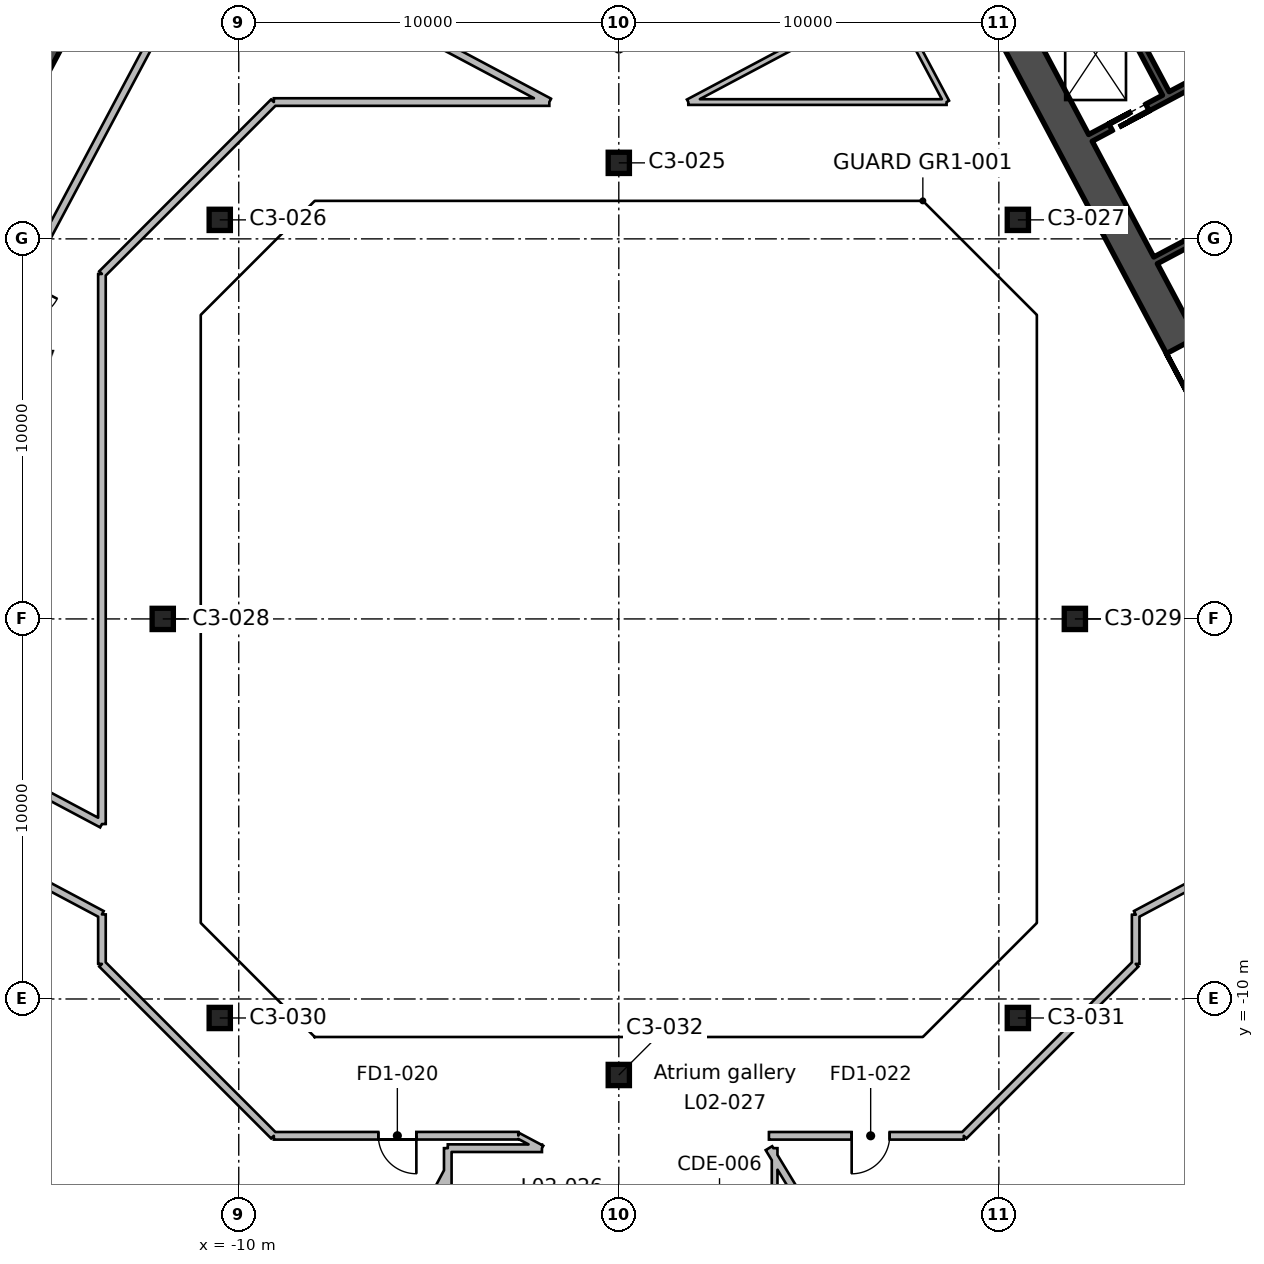
"""IFC4 building model, lengths in metres.
Left out: names, types, materials, properties, quantities, classifications, styles, units other than length and angle.
Written with IfcOpenShell. Run it as: python <this file> out.ifc"""

import sys

from ifc_helpers import new_model, si_unit, direction, frame, frame_2d, origin, origin_2d, place, context, subcontext, project, spatial, rectangle, hollow_rectangle, extrude, element, fill, save


model = new_model("IFC4")
c1 = context("Model", 3, precision=1e-05, world=origin(), true_north=direction((0.0, 1.0)))
c2 = subcontext(c1, "Body", "Model", "MODEL_VIEW")
j1 = project(units=[si_unit("LENGTHUNIT", "METRE"), si_unit("PLANEANGLEUNIT", "RADIAN")], contexts=[c1])
p1 = place(None, origin())
s1 = spatial("IfcSite", under=j1, at=p1, CompositionType="ELEMENT")
p2 = place(p1, origin())
s2 = spatial("IfcBuilding", under=s1, at=p2, CompositionType="ELEMENT")
p3 = place(p2, frame((0.0, 0.0, 12.2)))
s3 = spatial("IfcBuildingStorey", under=s2, at=p3, CompositionType="ELEMENT", Elevation=12.2)
for number, where, z_axis, x_axis in (
    (1, (0.0, -12.0, 0.0), (0.0, 0.0, 1.0), (1.0, 0.0, 0.0)),
    (2, (-10.5, -10.5, 0.0), (0.0, 0.0, 1.0), (1.0, 0.0, 0.0)),
    (3, (10.5, -10.5, 0.0), (0.0, 0.0, 1.0), (1.0, 0.0, 0.0)),
    (4, (-12.0, 0.0, 0.0), (0.0, 0.0, 1.0), (1.0, 0.0, 0.0)),
    (5, (12.0, 0.0, 0.0), (0.0, 0.0, 1.0), (1.0, 0.0, 0.0)),
    (6, (-10.5, 10.5, 0.0), (0.0, 0.0, 1.0), (1.0, 0.0, 0.0)),
    (7, (10.5, 10.5, 0.0), (0.0, 0.0, 1.0), (1.0, 0.0, 0.0)),
    (8, (0.0, 12.0, 0.0), (0.0, 0.0, 1.0), (1.0, 0.0, 0.0)),
):
    element("IfcColumn", number, at=place(p3, frame(where, z_axis=z_axis, x_axis=x_axis)), inside=s3, PredefinedType="COLUMN", context=c2, shape_type="SweptSolid", body=[
        extrude(hollow_rectangle(XDim=0.559, YDim=0.559, WallThickness=0.024, InnerFilletRadius=0.012, OuterFilletRadius=0.035, at=origin_2d()), origin(), (0.0, 0.0, 1.0), 5.4),
    ])
p4 = place(p3, frame((-13.362, 18.43, 0.0), z_axis=(0.0, 0.0, 1.0), x_axis=(-0.46947084998, -0.882947971864, 0.0)))
e9 = element("IfcWall", 9, at=p4, inside=s3, PredefinedType="SHEAR", context=c2, shape_type="SweptSolid", body=[
    extrude(rectangle(XDim=20.0, YDim=0.9, at=frame_2d((10.0, 0.0))), origin(), (0.0, 0.0, 1.0), 5.4),
])
p5 = place(p4, frame((7.0, 0.0, 0.0)))
e10 = element("IfcOpeningElement", 10, at=p5, cuts=e9, PredefinedType="OPENING", context=c2, shape_type="SweptSolid", body=[
    extrude(rectangle(XDim=2.4, YDim=2.4, at=frame_2d((1.2, 1.2))), frame((0.0, 0.46, 0.0), z_axis=(0.0, -1.0, 0.0), x_axis=(1.0, 0.0, 0.0)), (0.0, 0.0, 1.0), 0.92),
])
p6 = place(p3, frame((19.219, -1.107, 0.0), z_axis=(0.0, 0.0, 1.0), x_axis=(-0.46947084998, 0.882947971864, 0.0)))
e11 = element("IfcWall", 11, at=p6, inside=s3, PredefinedType="SHEAR", context=c2, shape_type="SweptSolid", body=[
    extrude(rectangle(XDim=20.0, YDim=0.9, at=frame_2d((10.0, 0.0))), origin(), (0.0, 0.0, 1.0), 5.4),
])
p7 = place(p6, frame((7.0, 0.0, 0.0)))
e12 = element("IfcOpeningElement", 12, at=p7, cuts=e11, PredefinedType="OPENING", context=c2, shape_type="SweptSolid", body=[
    extrude(rectangle(XDim=2.4, YDim=2.4, at=frame_2d((1.2, 1.2))), frame((0.0, 0.46, 0.0), z_axis=(0.0, -1.0, 0.0), x_axis=(1.0, 0.0, 0.0)), (0.0, 0.0, 1.0), 0.92),
])
p8 = place(p3, frame((14.394, 13.826, 0.0), z_axis=(0.0, 0.0, 1.0), x_axis=(-0.469494272526, 0.882935517501, 0.0)))
e13 = element("IfcWall", 13, at=p8, inside=s3, PredefinedType="SHEAR", context=c2, shape_type="SweptSolid", body=[
    extrude(rectangle(XDim=3.65, YDim=0.2, at=frame_2d((1.825, 0.0))), origin(), (0.0, 0.0, 1.0), 5.4),
])
p9 = place(p3, frame((18.138, 11.683, 0.0), z_axis=(0.0, 0.0, 1.0), x_axis=(-0.469480409012, 0.88294288918, 0.0)))
e14 = element("IfcWall", 14, at=p9, inside=s3, PredefinedType="SHEAR", context=c2, shape_type="SweptSolid", body=[
    extrude(rectangle(XDim=7.3, YDim=0.2, at=frame_2d((3.65, 0.0))), origin(), (0.0, 0.0, 1.0), 5.4),
])
p10 = place(p3, frame((14.124, 9.435, 0.0), z_axis=(0.0, 0.0, 1.0), x_axis=(0.882940221191, 0.469485426614, 0.0)))
e15 = element("IfcWall", 15, at=p10, inside=s3, PredefinedType="SHEAR", context=c2, shape_type="SweptSolid", body=[
    extrude(rectangle(XDim=10.0, YDim=0.2, at=frame_2d((5.0, 0.0))), origin(), (0.0, 0.0, 1.0), 5.4),
])
p11 = place(p10, frame((2.1, 0.0, 0.0)))
e16 = element("IfcOpeningElement", 16, at=p11, cuts=e15, PredefinedType="OPENING", context=c2, shape_type="SweptSolid", body=[
    extrude(rectangle(XDim=1.2, YDim=2.1, at=frame_2d((0.6, 1.05))), frame((0.0, 0.11, 0.0), z_axis=(0.0, -1.0, 0.0), x_axis=(1.0, 0.0, 0.0)), (0.0, 0.0, 1.0), 0.22),
])
p12 = place(p10, frame((5.4, 0.0, 0.0)))
e17 = element("IfcOpeningElement", 17, at=p12, cuts=e15, PredefinedType="OPENING", context=c2, shape_type="SweptSolid", body=[
    extrude(rectangle(XDim=1.1, YDim=2.1, at=frame_2d((0.55, 1.05))), frame((0.0, 0.11, 0.0), z_axis=(0.0, -1.0, 0.0), x_axis=(1.0, 0.0, 0.0)), (0.0, 0.0, 1.0), 0.22),
])
p13 = place(p10, frame((8.1, 0.0, 0.0)))
e18 = element("IfcOpeningElement", 18, at=p13, cuts=e15, PredefinedType="OPENING", context=c2, shape_type="SweptSolid", body=[
    extrude(rectangle(XDim=1.1, YDim=2.1, at=frame_2d((0.55, 1.05))), frame((0.0, 0.11, 0.0), z_axis=(0.0, -1.0, 0.0), x_axis=(1.0, 0.0, 0.0)), (0.0, 0.0, 1.0), 0.22),
])
p14 = place(p3, frame((12.41, 12.658, 0.0), z_axis=(0.0, 0.0, 1.0), x_axis=(0.8829484765, 0.469469900894, 0.0)))
e19 = element("IfcWall", 19, at=p14, inside=s3, PredefinedType="SHEAR", context=c2, shape_type="SweptSolid", body=[
    extrude(rectangle(XDim=4.5, YDim=0.2, at=frame_2d((2.25, 0.0))), origin(), (0.0, 0.0, 1.0), 5.4),
])
p15 = place(p14, frame((0.6, 0.0, 0.0)))
e20 = element("IfcOpeningElement", 20, at=p15, cuts=e19, PredefinedType="OPENING", context=c2, shape_type="SweptSolid", body=[
    extrude(rectangle(XDim=1.1, YDim=2.1, at=frame_2d((0.55, 1.05))), frame((0.0, 0.11, 0.0), z_axis=(0.0, -1.0, 0.0), x_axis=(1.0, 0.0, 0.0)), (0.0, 0.0, 1.0), 0.22),
])
p16 = place(p3, frame((-13.6, -9.077, 0.0), z_axis=(0.0, 0.0, 1.0), x_axis=(0.0, 1.0, 0.0)))
e21 = element("IfcWall", 21, at=p16, inside=s3, PredefinedType="PARTITIONING", context=c2, shape_type="SweptSolid", body=[
    extrude(rectangle(XDim=1.302, YDim=0.2, at=frame_2d((0.651, 0.0))), origin(), (0.0, 0.0, 1.0), 4.95),
])
p17 = place(p3, frame((-13.6, -7.775, 0.0), z_axis=(0.0, 0.0, 1.0), x_axis=(-0.882943264249, 0.469479703626, 0.0)))
e22 = element("IfcWall", 22, at=p17, inside=s3, PredefinedType="PARTITIONING", context=c2, shape_type="SweptSolid", body=[
    extrude(rectangle(XDim=34.636, YDim=0.2, at=frame_2d((17.318, 0.0))), origin(), (0.0, 0.0, 1.0), 4.95),
])
p18 = place(p17, frame((16.85, 0.0, 0.0)))
e23 = element("IfcOpeningElement", 23, at=p18, cuts=e22, PredefinedType="OPENING", context=c2, shape_type="SweptSolid", body=[
    extrude(rectangle(XDim=1.0, YDim=2.1, at=frame_2d((0.5, 1.05))), frame((0.0, 0.11, 0.0), z_axis=(0.0, -1.0, 0.0), x_axis=(1.0, 0.0, 0.0)), (0.0, 0.0, 1.0), 0.22),
])
p19 = place(p17, frame((14.25, 0.0, 0.0)))
e24 = element("IfcOpeningElement", 24, at=p19, cuts=e22, PredefinedType="OPENING", context=c2, shape_type="SweptSolid", body=[
    extrude(rectangle(XDim=1.0, YDim=2.1, at=frame_2d((0.5, 1.05))), frame((0.0, 0.11, 0.0), z_axis=(0.0, -1.0, 0.0), x_axis=(1.0, 0.0, 0.0)), (0.0, 0.0, 1.0), 0.22),
])
p20 = place(p3, frame((-13.6, -9.077, 0.0), z_axis=(0.0, 0.0, 1.0), x_axis=(0.707106781187, -0.707106781187, 0.0)))
e25 = element("IfcWall", 25, at=p20, inside=s3, PredefinedType="PARTITIONING", context=c2, shape_type="SweptSolid", body=[
    extrude(rectangle(XDim=6.397, YDim=0.2, at=frame_2d((3.198, 0.0))), origin(), (0.0, 0.0, 1.0), 4.95),
])
p21 = place(p3, frame((-9.077, -13.6, 0.0), z_axis=(0.0, 0.0, 1.0), x_axis=(0.999999878252, 0.000493452208, 0.0)))
e26 = element("IfcWall", 26, at=p21, inside=s3, PredefinedType="PARTITIONING", context=c2, shape_type="SweptSolid", body=[
    extrude(rectangle(XDim=6.432, YDim=0.2, at=frame_2d((3.216, 0.0))), origin(), (0.0, 0.0, 1.0), 4.95),
])
p22 = place(p21, frame((2.75, 0.0, 0.0)))
e27 = element("IfcOpeningElement", 27, at=p22, cuts=e26, PredefinedType="OPENING", context=c2, shape_type="SweptSolid", body=[
    extrude(rectangle(XDim=1.0, YDim=2.1, at=frame_2d((0.5, 1.05))), frame((0.0, 0.11, 0.0), z_axis=(0.0, -1.0, 0.0), x_axis=(1.0, 0.0, 0.0)), (0.0, 0.0, 1.0), 0.22),
])
p23 = place(p3, frame((-2.645, -13.597, 0.0), z_axis=(0.0, 0.0, 1.0), x_axis=(0.883079874776, -0.469222692083, 0.0)))
e28 = element("IfcWall", 28, at=p23, inside=s3, PredefinedType="PARTITIONING", context=c2, shape_type="SweptSolid", body=[
    extrude(rectangle(XDim=0.706, YDim=0.15, at=frame_2d((0.353, 0.0))), origin(), (0.0, 0.0, 1.0), 4.95),
])
p24 = place(p3, frame((-2.022, -13.928, 0.0), z_axis=(0.0, 0.0, 1.0), x_axis=(-0.999999301124, 0.001182265184, 0.0)))
e29 = element("IfcWall", 29, at=p24, inside=s3, PredefinedType="PARTITIONING", context=c2, shape_type="SweptSolid", body=[
    extrude(rectangle(XDim=2.478, YDim=0.2, at=frame_2d((1.239, 0.0))), origin(), (0.0, 0.0, 1.0), 4.95),
])
p25 = place(p3, frame((-4.5, -13.925, 0.0), z_axis=(0.0, 0.0, 1.0), x_axis=(0.0, -1.0, 0.0)))
e30 = element("IfcWall", 30, at=p25, inside=s3, PredefinedType="PARTITIONING", context=c2, shape_type="SweptSolid", body=[
    extrude(rectangle(XDim=2.05, YDim=0.2, at=frame_2d((1.025, 0.0))), origin(), (0.0, 0.0, 1.0), 4.95),
])
p26 = place(p3, frame((-4.5, -14.533, 0.0), z_axis=(0.0, 0.0, 1.0), x_axis=(-0.469522352041, -0.882920585859, 0.0)))
e31 = element("IfcWall", 31, at=p26, inside=s3, PredefinedType="PARTITIONING", context=c2, shape_type="SweptSolid", body=[
    extrude(rectangle(XDim=6.255, YDim=0.2, at=frame_2d((3.128, 0.0))), origin(), (0.0, 0.0, 1.0), 4.95),
])
p27 = place(p3, frame((4.1, -13.925, 0.0), z_axis=(0.0, 0.0, 1.0), x_axis=(0.0, -1.0, 0.0)))
e32 = element("IfcWall", 32, at=p27, inside=s3, PredefinedType="PARTITIONING", context=c2, shape_type="SweptSolid", body=[
    extrude(rectangle(XDim=2.05, YDim=0.15, at=frame_2d((1.025, 0.0))), origin(), (0.0, 0.0, 1.0), 4.95),
])
p28 = place(p3, frame((13.6, -7.782, 0.0), z_axis=(0.0, 0.0, 1.0), x_axis=(0.0, -1.0, 0.0)))
e33 = element("IfcWall", 33, at=p28, inside=s3, PredefinedType="PARTITIONING", context=c2, shape_type="SweptSolid", body=[
    extrude(rectangle(XDim=1.295, YDim=0.2, at=frame_2d((0.647, 0.0))), origin(), (0.0, 0.0, 1.0), 4.95),
])
p29 = place(p3, frame((13.6, -9.077, 0.0), z_axis=(0.0, 0.0, 1.0), x_axis=(-0.707106781187, -0.707106781187, 0.0)))
e34 = element("IfcWall", 34, at=p29, inside=s3, PredefinedType="PARTITIONING", context=c2, shape_type="SweptSolid", body=[
    extrude(rectangle(XDim=6.397, YDim=0.2, at=frame_2d((3.198, 0.0))), origin(), (0.0, 0.0, 1.0), 4.95),
])
p30 = place(p3, frame((9.077, -13.6, 0.0), z_axis=(0.0, 0.0, 1.0), x_axis=(-1.0, 0.0, 0.0)))
e35 = element("IfcWall", 35, at=p30, inside=s3, PredefinedType="PARTITIONING", context=c2, shape_type="SweptSolid", body=[
    extrude(rectangle(XDim=5.127, YDim=0.2, at=frame_2d((2.563, 0.0))), origin(), (0.0, 0.0, 1.0), 4.95),
])
p31 = place(p30, frame((1.95, 0.0, 0.0)))
e36 = element("IfcOpeningElement", 36, at=p31, cuts=e35, PredefinedType="OPENING", context=c2, shape_type="SweptSolid", body=[
    extrude(rectangle(XDim=1.0, YDim=2.1, at=frame_2d((0.5, 1.05))), frame((0.0, 0.11, 0.0), z_axis=(0.0, -1.0, 0.0), x_axis=(1.0, 0.0, 0.0)), (0.0, 0.0, 1.0), 0.22),
])
p32 = place(p3, frame((7.609, -19.965, 0.0), z_axis=(0.0, 0.0, 1.0), x_axis=(-0.518126246201, 0.855304152333, 0.0)))
e37 = element("IfcWall", 37, at=p32, inside=s3, PredefinedType="PARTITIONING", context=c2, shape_type="SweptSolid", body=[
    extrude(rectangle(XDim=7.062, YDim=0.2, at=frame_2d((3.531, 0.0))), origin(), (0.0, 0.0, 1.0), 4.95),
])
p33 = place(p3, frame((47.736, 10.375, 0.0), z_axis=(0.0, 0.0, 1.0), x_axis=(-0.882953206174, -0.469461005524, 0.0)))
e38 = element("IfcWall", 38, at=p33, inside=s3, PredefinedType="PARTITIONING", context=c2, shape_type="SweptSolid", body=[
    extrude(rectangle(XDim=38.661, YDim=0.2, at=frame_2d((19.331, 0.0))), origin(), (0.0, 0.0, 1.0), 4.95),
])
p34 = place(p33, frame((18.85, 0.0, 0.0)))
e39 = element("IfcOpeningElement", 39, at=p34, cuts=e38, PredefinedType="OPENING", context=c2, shape_type="SweptSolid", body=[
    extrude(rectangle(XDim=1.0, YDim=2.1, at=frame_2d((0.5, 1.05))), frame((0.0, 0.11, 0.0), z_axis=(0.0, -1.0, 0.0), x_axis=(1.0, 0.0, 0.0)), (0.0, 0.0, 1.0), 0.22),
])
p35 = place(p33, frame((15.45, 0.0, 0.0)))
e40 = element("IfcOpeningElement", 40, at=p35, cuts=e38, PredefinedType="OPENING", context=c2, shape_type="SweptSolid", body=[
    extrude(rectangle(XDim=1.0, YDim=2.1, at=frame_2d((0.5, 1.05))), frame((0.0, 0.11, 0.0), z_axis=(0.0, -1.0, 0.0), x_axis=(1.0, 0.0, 0.0)), (0.0, 0.0, 1.0), 0.22),
])
p36 = place(p3, frame((-21.128, -1.394, 0.0), z_axis=(0.0, 0.0, 1.0), x_axis=(0.46951219964, 0.882925984661, 0.0)))
e41 = element("IfcWall", 41, at=p36, inside=s3, PredefinedType="PARTITIONING", context=c2, shape_type="SweptSolid", body=[
    extrude(rectangle(XDim=22.3, YDim=0.2, at=frame_2d((11.15, 0.0))), origin(), (0.0, 0.0, 1.0), 4.95),
])
p37 = place(p36, frame((10.65, 0.0, 0.0)))
e42 = element("IfcOpeningElement", 42, at=p37, cuts=e41, PredefinedType="OPENING", context=c2, shape_type="SweptSolid", body=[
    extrude(rectangle(XDim=1.0, YDim=2.1, at=frame_2d((0.5, 1.05))), frame((0.0, 0.11, 0.0), z_axis=(0.0, -1.0, 0.0), x_axis=(1.0, 0.0, 0.0)), (0.0, 0.0, 1.0), 0.22),
])
p38 = place(p3, frame((-10.658, 18.295, 0.0), z_axis=(0.0, 0.0, 1.0), x_axis=(0.88295636352, -0.4694550672, 0.0)))
e43 = element("IfcWall", 43, at=p38, inside=s3, PredefinedType="PARTITIONING", context=c2, shape_type="SweptSolid", body=[
    extrude(rectangle(XDim=10.0, YDim=0.2, at=frame_2d((5.0, 0.0))), origin(), (0.0, 0.0, 1.0), 4.95),
])
p39 = place(p3, frame((-1.828, 13.6, 0.0), z_axis=(0.0, 0.0, 1.0), x_axis=(-1.0, 0.0, 0.0)))
e44 = element("IfcWall", 44, at=p39, inside=s3, PredefinedType="PARTITIONING", context=c2, shape_type="SweptSolid", body=[
    extrude(rectangle(XDim=7.249, YDim=0.2, at=frame_2d((3.625, 0.0))), origin(), (0.0, 0.0, 1.0), 4.95),
])
p40 = place(p3, frame((-9.077, 13.6, 0.0), z_axis=(0.0, 0.0, 1.0), x_axis=(-0.707106781187, -0.707106781187, 0.0)))
e45 = element("IfcWall", 45, at=p40, inside=s3, PredefinedType="PARTITIONING", context=c2, shape_type="SweptSolid", body=[
    extrude(rectangle(XDim=6.397, YDim=0.2, at=frame_2d((3.198, 0.0))), origin(), (0.0, 0.0, 1.0), 4.95),
])
p41 = place(p3, frame((-13.6, 9.077, 0.0), z_axis=(0.0, 0.0, 1.0), x_axis=(0.0, -1.0, 0.0)))
e46 = element("IfcWall", 46, at=p41, inside=s3, PredefinedType="PARTITIONING", context=c2, shape_type="SweptSolid", body=[
    extrude(rectangle(XDim=14.474, YDim=0.2, at=frame_2d((7.237, 0.0))), origin(), (0.0, 0.0, 1.0), 4.95),
])
p42 = place(p3, frame((-13.6, -5.397, 0.0), z_axis=(0.0, 0.0, 1.0), x_axis=(-0.882932501381, 0.469499944627, 0.0)))
e47 = element("IfcWall", 47, at=p42, inside=s3, PredefinedType="PARTITIONING", context=c2, shape_type="SweptSolid", body=[
    extrude(rectangle(XDim=8.526, YDim=0.2, at=frame_2d((4.263, 0.0))), origin(), (0.0, 0.0, 1.0), 4.95),
])
p43 = place(p3, frame((1.828, 13.6, 0.0), z_axis=(0.0, 0.0, 1.0), x_axis=(1.0, 0.0, 0.0)))
e48 = element("IfcWall", 48, at=p43, inside=s3, PredefinedType="PARTITIONING", context=c2, shape_type="SweptSolid", body=[
    extrude(rectangle(XDim=6.797, YDim=0.15, at=frame_2d((3.398, 0.0))), origin(), (0.0, 0.0, 1.0), 4.95),
])
p44 = place(p3, frame((8.625, 13.6, 0.0), z_axis=(0.0, 0.0, 1.0), x_axis=(-0.46953936544, 0.882911538209, 0.0)))
e49 = element("IfcWall", 49, at=p44, inside=s3, PredefinedType="PARTITIONING", context=c2, shape_type="SweptSolid", body=[
    extrude(rectangle(XDim=3.19, YDim=0.15, at=frame_2d((1.595, 0.0))), origin(), (0.0, 0.0, 1.0), 4.95),
])
p45 = place(p3, frame((7.127, 16.417, 0.0), z_axis=(0.0, 0.0, 1.0), x_axis=(-0.882994016778, -0.469384241676, 0.0)))
e50 = element("IfcWall", 50, at=p45, inside=s3, PredefinedType="PARTITIONING", context=c2, shape_type="SweptSolid", body=[
    extrude(rectangle(XDim=6.001, YDim=0.15, at=frame_2d((3.0, 0.0))), origin(), (0.0, 0.0, 1.0), 4.95),
])
p46 = place(p7, frame((2.4, 0.0, 0.0), z_axis=(0.0, 0.0, 1.0), x_axis=(-1.0, 0.0, 0.0)))
e51 = element("IfcDoor", 51, at=p46, inside=s3, OperationType="DOUBLE_DOOR_SINGLE_SWING", PredefinedType="DOOR", context=c2, shape_type="SweptSolid", body=[
    extrude(rectangle(XDim=2.4, YDim=2.4, at=frame_2d((1.2, 1.2))), frame((0.0, 0.025, 0.0), z_axis=(0.0, -1.0, 0.0), x_axis=(1.0, 0.0, 0.0)), (0.0, 0.0, 1.0), 0.05),
])
fill(e12, e51)
p47 = place(p15, origin())
e52 = element("IfcDoor", 52, at=p47, inside=s3, OperationType="DOUBLE_DOOR_SLIDING", PredefinedType="DOOR", context=c2, shape_type="SweptSolid", body=[
    extrude(rectangle(XDim=1.1, YDim=2.1, at=frame_2d((0.55, 1.05))), frame((0.0, 0.025, 0.0), z_axis=(0.0, -1.0, 0.0), x_axis=(1.0, 0.0, 0.0)), (0.0, 0.0, 1.0), 0.05),
])
fill(e20, e52)
p48 = place(p31, origin())
e53 = element("IfcDoor", 53, at=p48, inside=s3, OperationType="SINGLE_SWING_RIGHT", PredefinedType="DOOR", context=c2, shape_type="SweptSolid", body=[
    extrude(rectangle(XDim=1.0, YDim=2.1, at=frame_2d((0.5, 1.05))), frame((0.0, 0.025, 0.0), z_axis=(0.0, -1.0, 0.0), x_axis=(1.0, 0.0, 0.0)), (0.0, 0.0, 1.0), 0.05),
])
fill(e36, e53)
p49 = place(p22, frame((1.0, 0.0, 0.0), z_axis=(0.0, 0.0, 1.0), x_axis=(-1.0, 0.0, 0.0)))
e54 = element("IfcDoor", 54, at=p49, inside=s3, OperationType="SINGLE_SWING_LEFT", PredefinedType="DOOR", context=c2, shape_type="SweptSolid", body=[
    extrude(rectangle(XDim=1.0, YDim=2.1, at=frame_2d((0.5, 1.05))), frame((0.0, 0.025, 0.0), z_axis=(0.0, -1.0, 0.0), x_axis=(1.0, 0.0, 0.0)), (0.0, 0.0, 1.0), 0.05),
])
fill(e27, e54)
save(model, sys.argv[1])
